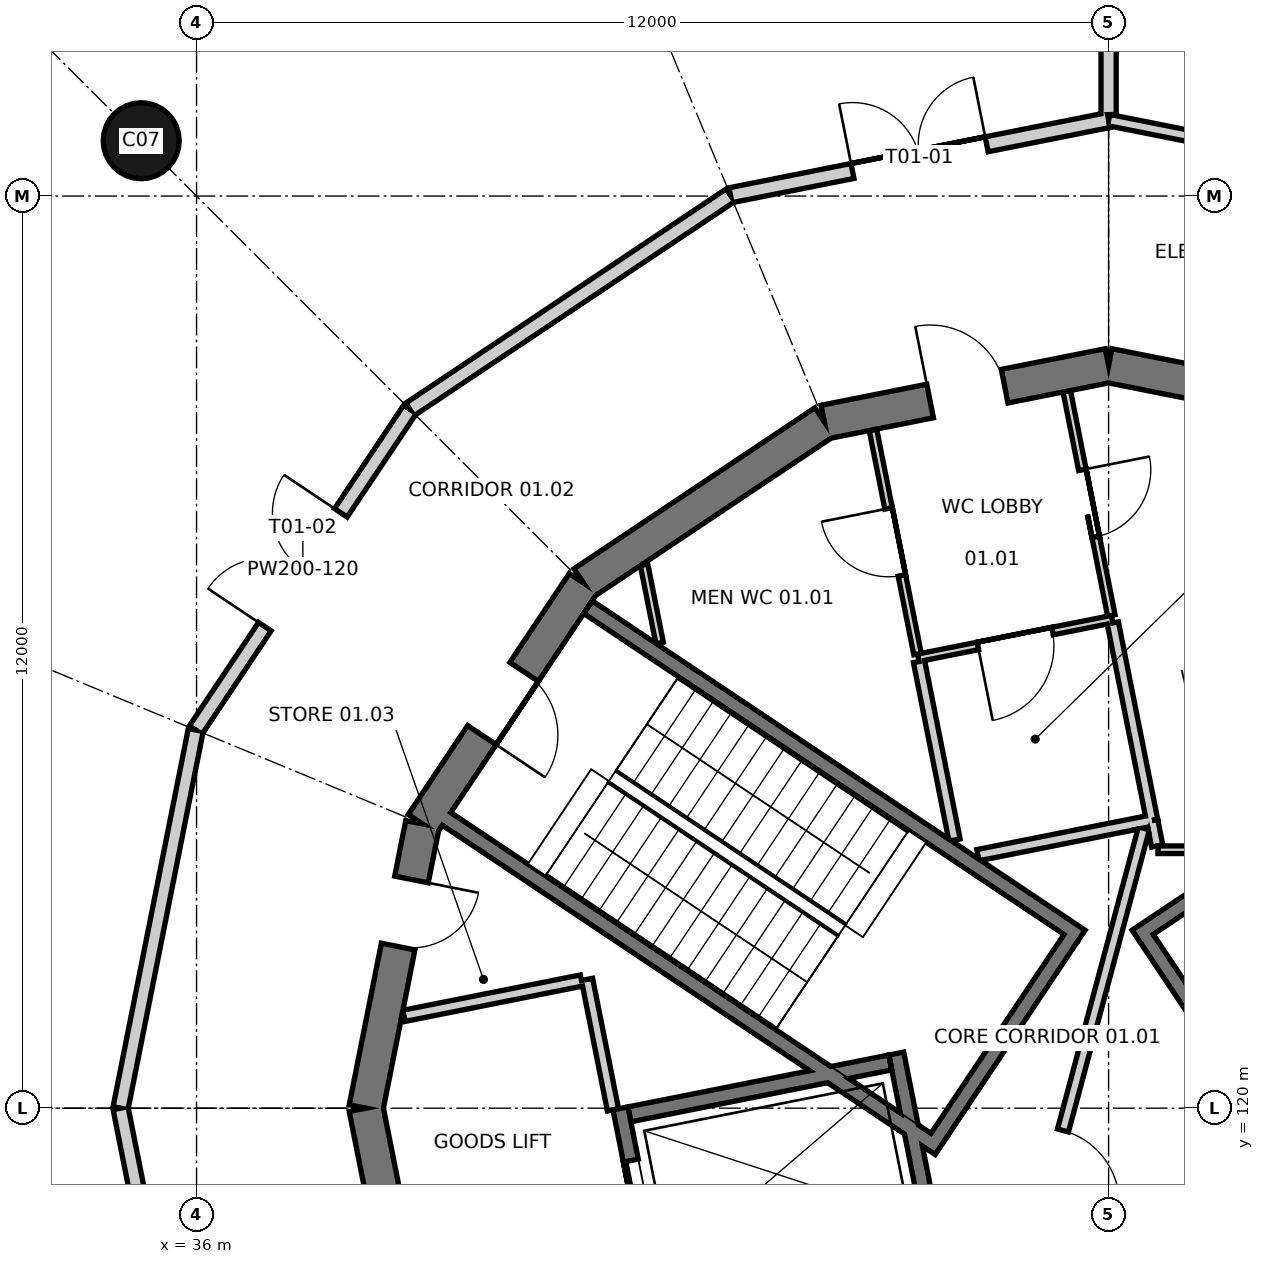
"""IFC4 building model, lengths in metres.
Left out: names, types, materials, properties, quantities, classifications, styles, units other than length and angle.
Written with IfcOpenShell. Run it as: python <this file> out.ifc"""

import sys

from ifc_helpers import new_model, si_unit, direction, frame, frame_2d, origin, origin_2d, place, context, subcontext, project, spatial, polyline, rectangle, circle, outline, extrude, element, fill, save


model = new_model("IFC4")
c1 = context("Model", 3, precision=1e-05, world=origin(), true_north=direction((0.0, 1.0)))
c2 = subcontext(c1, "Body", "Model", "MODEL_VIEW")
j1 = project(units=[si_unit("LENGTHUNIT", "METRE"), si_unit("PLANEANGLEUNIT", "RADIAN")], contexts=[c1])
p1 = place(None, origin())
s1 = spatial("IfcSite", under=j1, at=p1, CompositionType="ELEMENT")
p2 = place(p1, origin())
s2 = spatial("IfcBuilding", under=s1, at=p2, CompositionType="ELEMENT")
p3 = place(p2, frame((0.0, 0.0, 6.0)))
s3 = spatial("IfcBuildingStorey", under=s2, at=p3, CompositionType="ELEMENT", Elevation=6.0)
p4 = place(p3, frame((51.739, 129.027, 0.0), z_axis=(0.0, 0.0, 1.0), x_axis=(-0.98078948206, 0.195069197673, 0.0)))
e1 = element("IfcWall", 1, at=p4, inside=s3, PredefinedType="SHEAR", context=c2, shape_type="SweptSolid", body=[
    extrude(outline(polyline([(-0.045, -0.225), (3.857, -0.225), (3.768, 0.225), (0.045, 0.225), (-0.045, -0.225)])), origin(), (0.0, 0.0, 1.0), 4.8),
])
p5 = place(p3, frame((48.0, 129.771, 0.0), z_axis=(0.0, 0.0, 1.0), x_axis=(-0.98078948206, -0.195069197673, 0.0)))
e2 = element("IfcWall", 2, at=p5, inside=s3, PredefinedType="SHEAR", context=c2, shape_type="SweptSolid", body=[
    extrude(outline(polyline([(-0.045, -0.225), (3.857, -0.225), (3.768, 0.225), (0.045, 0.225), (-0.045, -0.225)])), origin(), (0.0, 0.0, 1.0), 4.8),
])
p6 = place(p5, frame((1.395, 0.0, 0.0)))
e3 = element("IfcOpeningElement", 3, at=p6, cuts=e2, PredefinedType="OPENING", context=c2, shape_type="SweptSolid", body=[
    extrude(rectangle(XDim=1.0, YDim=2.1, at=frame_2d((0.5, 1.05))), frame((0.0, 0.235, 0.0), z_axis=(0.0, -1.0, 0.0), x_axis=(1.0, 0.0, 0.0)), (0.0, 0.0, 1.0), 0.47),
])
p7 = place(p3, frame((44.261, 129.027, 0.0), z_axis=(0.0, 0.0, 1.0), x_axis=(-0.83148829117, -0.555542277102, 0.0)))
e4 = element("IfcWall", 4, at=p7, inside=s3, PredefinedType="SHEAR", context=c2, shape_type="SweptSolid", body=[
    extrude(outline(polyline([(-0.045, -0.225), (3.857, -0.225), (3.768, 0.225), (0.045, 0.225), (-0.045, -0.225)])), origin(), (0.0, 0.0, 1.0), 4.8),
])
p8 = place(p3, frame((41.091, 126.909, 0.0), z_axis=(0.0, 0.0, 1.0), x_axis=(-0.555542277102, -0.83148829117, 0.0)))
e5 = element("IfcWall", 5, at=p8, inside=s3, PredefinedType="SHEAR", context=c2, shape_type="SweptSolid", body=[
    extrude(outline(polyline([(-0.045, -0.225), (3.857, -0.225), (3.768, 0.225), (0.045, 0.225), (-0.045, -0.225)])), origin(), (0.0, 0.0, 1.0), 4.8),
])
p9 = place(p8, frame((1.406, 0.0, 0.0)))
e6 = element("IfcOpeningElement", 6, at=p9, cuts=e5, PredefinedType="OPENING", context=c2, shape_type="SweptSolid", body=[
    extrude(rectangle(XDim=1.0, YDim=2.1, at=frame_2d((0.5, 1.05))), frame((0.0, 0.235, 0.0), z_axis=(0.0, -1.0, 0.0), x_axis=(1.0, 0.0, 0.0)), (0.0, 0.0, 1.0), 0.47),
])
p10 = place(p3, frame((38.973, 123.739, 0.0), z_axis=(0.0, 0.0, 1.0), x_axis=(-0.195069197673, -0.98078948206, 0.0)))
e7 = element("IfcWall", 7, at=p10, inside=s3, PredefinedType="SHEAR", context=c2, shape_type="SweptSolid", body=[
    extrude(outline(polyline([(-0.045, -0.225), (3.857, -0.225), (3.768, 0.225), (0.045, 0.225), (-0.045, -0.225)])), origin(), (0.0, 0.0, 1.0), 4.8),
])
p11 = place(p10, frame((0.745, 0.0, 0.0)))
e8 = element("IfcOpeningElement", 8, at=p11, cuts=e7, PredefinedType="OPENING", context=c2, shape_type="SweptSolid", body=[
    extrude(rectangle(XDim=0.9, YDim=2.1, at=frame_2d((0.45, 1.05))), frame((0.0, 0.235, 0.0), z_axis=(0.0, -1.0, 0.0), x_axis=(1.0, 0.0, 0.0)), (0.0, 0.0, 1.0), 0.47),
])
p12 = place(p3, frame((38.229, 120.0, 0.0), z_axis=(0.0, 0.0, 1.0), x_axis=(0.195069197673, -0.98078948206, 0.0)))
e9 = element("IfcWall", 9, at=p12, inside=s3, PredefinedType="SHEAR", context=c2, shape_type="SweptSolid", body=[
    extrude(outline(polyline([(-0.045, -0.225), (3.857, -0.225), (3.768, 0.225), (0.045, 0.225), (-0.045, -0.225)])), origin(), (0.0, 0.0, 1.0), 4.8),
])
p13 = place(p12, frame((1.095, 0.0, 0.0)))
e10 = element("IfcOpeningElement", 10, at=p13, cuts=e9, PredefinedType="OPENING", context=c2, shape_type="SweptSolid", body=[
    extrude(rectangle(XDim=1.6, YDim=2.1, at=frame_2d((0.8, 1.05))), frame((0.0, 0.235, 0.0), z_axis=(0.0, -1.0, 0.0), x_axis=(1.0, 0.0, 0.0)), (0.0, 0.0, 1.0), 0.47),
])
p14 = place(p3, frame((48.365, 122.258, 0.0), z_axis=(0.0, 0.0, 1.0), x_axis=(0.831476803301, 0.555559470779, 0.0)))
e11 = element("IfcWall", 11, at=p14, inside=s3, PredefinedType="SHEAR", context=c2, shape_type="SweptSolid", body=[
    extrude(rectangle(XDim=7.8, YDim=0.2, at=frame_2d((3.9, 0.0))), origin(), (0.0, 0.0, 1.0), 4.8),
])
p15 = place(p3, frame((50.253, 119.612, 0.0), z_axis=(0.0, 0.0, 1.0), x_axis=(-0.55555842186, 0.831477504146, 0.0)))
e12 = element("IfcWall", 12, at=p15, inside=s3, PredefinedType="SHEAR", context=c2, shape_type="SweptSolid", body=[
    extrude(rectangle(XDim=3.15, YDim=0.2, at=frame_2d((1.575, 0.0))), origin(), (0.0, 0.0, 1.0), 4.8),
])
p16 = place(p3, frame((45.774, 119.473, 0.0), z_axis=(0.0, 0.0, 1.0), x_axis=(-0.831486463828, 0.555545012102, 0.0)))
e13 = element("IfcWall", 13, at=p16, inside=s3, PredefinedType="SHEAR", context=c2, shape_type="SweptSolid", body=[
    extrude(rectangle(XDim=7.8, YDim=0.2, at=frame_2d((3.9, 0.0))), origin(), (0.0, 0.0, 1.0), 4.8),
])
p17 = place(p3, frame((47.635, 122.258, 0.0), z_axis=(0.0, 0.0, 1.0), x_axis=(-0.831476803301, 0.555559470779, 0.0)))
e14 = element("IfcWall", 14, at=p17, inside=s3, PredefinedType="SHEAR", context=c2, shape_type="SweptSolid", body=[
    extrude(rectangle(XDim=7.8, YDim=0.2, at=frame_2d((3.9, 0.0))), origin(), (0.0, 0.0, 1.0), 4.8),
])
p18 = place(p3, frame((47.497, 122.231, 0.0), z_axis=(0.0, 0.0, 1.0), x_axis=(-0.55555842186, -0.831477504146, 0.0)))
e15 = element("IfcWall", 15, at=p18, inside=s3, PredefinedType="SHEAR", context=c2, shape_type="SweptSolid", body=[
    extrude(rectangle(XDim=3.15, YDim=0.2, at=frame_2d((1.575, 0.0))), origin(), (0.0, 0.0, 1.0), 4.8),
])
p19 = place(p3, frame((41.577, 119.997, 0.0), z_axis=(0.0, 0.0, 1.0), x_axis=(0.195120673769, -0.980779242576, 0.0)))
e16 = element("IfcWall", 16, at=p19, inside=s3, PredefinedType="SHEAR", context=c2, shape_type="SweptSolid", body=[
    extrude(rectangle(XDim=2.5, YDim=0.2, at=frame_2d((1.25, 0.0))), origin(), (0.0, 0.0, 1.0), 4.8),
])
p20 = place(p19, frame((0.7, 0.0, 0.0)))
e17 = element("IfcOpeningElement", 17, at=p20, cuts=e16, PredefinedType="OPENING", context=c2, shape_type="SweptSolid", body=[
    extrude(rectangle(XDim=1.1, YDim=2.1, at=frame_2d((0.55, 1.05))), frame((0.0, 0.11, 0.0), z_axis=(0.0, -1.0, 0.0), x_axis=(1.0, 0.0, 0.0)), (0.0, 0.0, 1.0), 0.22),
])
p21 = place(p3, frame((45.206, 120.719, 0.0), z_axis=(0.0, 0.0, 1.0), x_axis=(0.195158270522, -0.980771762158, 0.0)))
e18 = element("IfcWall", 18, at=p21, inside=s3, PredefinedType="SHEAR", context=c2, shape_type="SweptSolid", body=[
    extrude(rectangle(XDim=2.647, YDim=0.2, at=frame_2d((1.323, 0.0))), origin(), (0.0, 0.0, 1.0), 4.8),
])
p22 = place(p3, frame((45.127, 120.601, 0.0), z_axis=(0.0, 0.0, 1.0), x_axis=(-0.980794727808, -0.195042820694, 0.0)))
e19 = element("IfcWall", 19, at=p22, inside=s3, PredefinedType="SHEAR", context=c2, shape_type="SweptSolid", body=[
    extrude(rectangle(XDim=3.5, YDim=0.2, at=frame_2d((1.75, 0.0))), origin(), (0.0, 0.0, 1.0), 4.8),
])
p23 = place(p3, frame((35.272, 132.728, 0.0), z_axis=(0.0, 0.0, 1.0), x_axis=(1.0, 0.0, 0.0)))
e20 = element("IfcColumn", 20, at=p23, inside=s3, PredefinedType="COLUMN", context=c2, shape_type="SweptSolid", body=[
    extrude(circle(Radius=0.5, at=origin_2d()), origin(), (0.0, 0.0, 1.0), 4.8),
])
p24 = place(p3, frame((41.479, 119.977, 0.0), z_axis=(0.0, 0.0, 1.0), x_axis=(-0.19501613536, 0.98080003413, 0.0)))
e21 = element("IfcWall", 21, at=p24, inside=s3, PredefinedType="PARTITIONING", context=c2, shape_type="SweptSolid", body=[
    extrude(rectangle(XDim=1.75, YDim=0.15, at=frame_2d((0.875, 0.0))), origin(), (0.0, 0.0, 1.0), 4.5),
])
p25 = place(p3, frame((41.064, 121.679, 0.0), z_axis=(0.0, 0.0, 1.0), x_axis=(-0.980781272394, -0.195110470559, 0.0)))
e22 = element("IfcWall", 22, at=p25, inside=s3, PredefinedType="PARTITIONING", context=c2, shape_type="SweptSolid", body=[
    extrude(rectangle(XDim=2.381, YDim=0.15, at=frame_2d((1.19, 0.0))), origin(), (0.0, 0.0, 1.0), 4.5),
])
p26 = place(p3, frame((48.046, 126.433, 0.0), z_axis=(0.0, 0.0, 1.0), x_axis=(-0.980778805994, -0.195122868248, 0.0)))
e23 = element("IfcWall", 23, at=p26, inside=s3, PredefinedType="PARTITIONING", context=c2, shape_type="SweptSolid", body=[
    extrude(rectangle(XDim=2.6, YDim=0.1, at=frame_2d((1.3, 0.0))), origin(), (0.0, 0.0, 1.0), 4.5),
])
p27 = place(p26, frame((0.8, 0.0, 0.0)))
e24 = element("IfcOpeningElement", 24, at=p27, cuts=e23, PredefinedType="OPENING", context=c2, shape_type="SweptSolid", body=[
    extrude(rectangle(XDim=1.0, YDim=2.1, at=frame_2d((0.5, 1.05))), frame((0.0, 0.06, 0.0), z_axis=(0.0, -1.0, 0.0), x_axis=(1.0, 0.0, 0.0)), (0.0, 0.0, 1.0), 0.12),
])
p28 = place(p3, frame((45.486, 125.974, 0.0), z_axis=(0.0, 0.0, 1.0), x_axis=(-0.195054549846, 0.980792395252, 0.0)))
e25 = element("IfcWall", 25, at=p28, inside=s3, PredefinedType="PARTITIONING", context=c2, shape_type="SweptSolid", body=[
    extrude(rectangle(XDim=3.008, YDim=0.1, at=frame_2d((1.504, 0.0))), origin(), (0.0, 0.0, 1.0), 4.5),
])
p29 = place(p28, frame((1.054, 0.0, 0.0)))
e26 = element("IfcOpeningElement", 26, at=p29, cuts=e25, PredefinedType="OPENING", context=c2, shape_type="SweptSolid", body=[
    extrude(rectangle(XDim=0.9, YDim=2.1, at=frame_2d((0.45, 1.05))), frame((0.0, 0.06, 0.0), z_axis=(0.0, -1.0, 0.0), x_axis=(1.0, 0.0, 0.0)), (0.0, 0.0, 1.0), 0.12),
])
p30 = place(p3, frame((47.449, 129.432, 0.0), z_axis=(0.0, 0.0, 1.0), x_axis=(0.195054549846, -0.980792395252, 0.0)))
e27 = element("IfcWall", 27, at=p30, inside=s3, PredefinedType="PARTITIONING", context=c2, shape_type="SweptSolid", body=[
    extrude(rectangle(XDim=3.008, YDim=0.1, at=frame_2d((1.504, 0.0))), origin(), (0.0, 0.0, 1.0), 4.5),
])
p31 = place(p30, frame((1.054, 0.0, 0.0)))
e28 = element("IfcOpeningElement", 28, at=p31, cuts=e27, PredefinedType="OPENING", context=c2, shape_type="SweptSolid", body=[
    extrude(rectangle(XDim=0.9, YDim=2.1, at=frame_2d((0.45, 1.05))), frame((0.0, 0.06, 0.0), z_axis=(0.0, -1.0, 0.0), x_axis=(1.0, 0.0, 0.0)), (0.0, 0.0, 1.0), 0.12),
])
p32 = place(p3, frame((48.056, 126.384, 0.0), z_axis=(0.0, 0.0, 1.0), x_axis=(0.195123903338, -0.980778600065, 0.0)))
e29 = element("IfcWall", 29, at=p32, inside=s3, PredefinedType="PARTITIONING", context=c2, shape_type="SweptSolid", body=[
    extrude(rectangle(XDim=2.65, YDim=0.15, at=frame_2d((1.325, 0.0))), origin(), (0.0, 0.0, 1.0), 4.5),
])
p33 = place(p3, frame((48.524, 123.775, 0.0), z_axis=(0.0, 0.0, 1.0), x_axis=(-0.980777249161, -0.195130693455, 0.0)))
e30 = element("IfcWall", 30, at=p33, inside=s3, PredefinedType="PARTITIONING", context=c2, shape_type="SweptSolid", body=[
    extrude(rectangle(XDim=2.287, YDim=0.15, at=frame_2d((1.144, 0.0))), origin(), (0.0, 0.0, 1.0), 4.5),
])
p34 = place(p3, frame((45.973, 123.528, 0.0), z_axis=(0.0, 0.0, 1.0), x_axis=(-0.195135731435, 0.980776246815, 0.0)))
e31 = element("IfcWall", 31, at=p34, inside=s3, PredefinedType="PARTITIONING", context=c2, shape_type="SweptSolid", body=[
    extrude(rectangle(XDim=2.395, YDim=0.15, at=frame_2d((1.197, 0.0))), origin(), (0.0, 0.0, 1.0), 4.5),
])
p35 = place(p3, frame((42.093, 126.12, 0.0), z_axis=(0.0, 0.0, 1.0), x_axis=(-0.195175461866, 0.980768341192, 0.0)))
e32 = element("IfcWall", 32, at=p35, inside=s3, PredefinedType="PARTITIONING", context=c2, shape_type="SweptSolid", body=[
    extrude(rectangle(XDim=1.048, YDim=0.1, at=frame_2d((0.524, 0.0))), origin(), (0.0, 0.0, 1.0), 4.5),
])
p36 = place(p3, frame((49.823, 123.4, 0.0), z_axis=(0.0, 0.0, 1.0), x_axis=(-1.0, 0.0, 0.0)))
e33 = element("IfcWall", 33, at=p36, inside=s3, PredefinedType="PARTITIONING", context=c2, shape_type="SweptSolid", body=[
    extrude(rectangle(XDim=1.174, YDim=0.1, at=frame_2d((0.587, 0.0))), origin(), (0.0, 0.0, 1.0), 4.5),
])
p37 = place(p3, frame((48.639, 123.449, 0.0), z_axis=(0.0, 0.0, 1.0), x_axis=(-0.194880473507, 0.98082699853, 0.0)))
e34 = element("IfcWall", 34, at=p37, inside=s3, PredefinedType="PARTITIONING", context=c2, shape_type="SweptSolid", body=[
    extrude(rectangle(XDim=0.342, YDim=0.15, at=frame_2d((0.171, 0.0))), origin(), (0.0, 0.0, 1.0), 4.5),
])
p38 = place(p3, frame((47.102, 118.595, 0.0), z_axis=(0.0, 0.0, 1.0), x_axis=(0.258814124304, 0.9659271448, 0.0)))
e35 = element("IfcWall", 35, at=p38, inside=s3, PredefinedType="PARTITIONING", context=c2, shape_type="SweptSolid", body=[
    extrude(rectangle(XDim=5.265, YDim=0.15, at=frame_2d((2.632, 0.0))), origin(), (0.0, 0.0, 1.0), 4.5),
])
p39 = place(p38, frame((0.15, 0.0, 0.0)))
e36 = element("IfcOpeningElement", 36, at=p39, cuts=e35, PredefinedType="OPENING", context=c2, shape_type="SweptSolid", body=[
    extrude(rectangle(XDim=1.0, YDim=2.1, at=frame_2d((0.5, 1.05))), frame((0.0, 0.085, 0.0), z_axis=(0.0, -1.0, 0.0), x_axis=(1.0, 0.0, 0.0)), (0.0, 0.0, 1.0), 0.17),
])
p40 = place(p3, frame((48.0, 133.0, 0.0), z_axis=(0.0, 0.0, 1.0), x_axis=(0.980787465891, -0.195079334507, 0.0)))
e37 = element("IfcWall", 37, at=p40, inside=s3, PredefinedType="PARTITIONING", context=c2, shape_type="SweptSolid", body=[
    extrude(rectangle(XDim=5.072, YDim=0.15, at=frame_2d((2.536, 0.0))), origin(), (0.0, 0.0, 1.0), 4.5),
])
p41 = place(p40, frame((2.036, 0.0, 0.0)))
e38 = element("IfcOpeningElement", 38, at=p41, cuts=e37, PredefinedType="OPENING", context=c2, shape_type="SweptSolid", body=[
    extrude(rectangle(XDim=1.0, YDim=2.1, at=frame_2d((0.5, 1.05))), frame((0.0, 0.085, 0.0), z_axis=(0.0, -1.0, 0.0), x_axis=(1.0, 0.0, 0.0)), (0.0, 0.0, 1.0), 0.17),
])
p42 = place(p3, frame((35.0, 120.0, 0.0), z_axis=(0.0, 0.0, 1.0), x_axis=(0.195079334507, 0.980787465891, 0.0)))
e39 = element("IfcWall", 39, at=p42, inside=s3, PredefinedType="SOLIDWALL", context=c2, shape_type="SweptSolid", body=[
    extrude(rectangle(XDim=5.072, YDim=0.2, at=frame_2d((2.536, 0.0))), origin(), (0.0, 0.0, 1.0), 4.5),
])
p43 = place(p3, frame((35.99, 124.975, 0.0), z_axis=(0.0, 0.0, 1.0), x_axis=(0.555577354854, 0.831464853601, 0.0)))
e40 = element("IfcWall", 40, at=p43, inside=s3, PredefinedType="SOLIDWALL", context=c2, shape_type="SweptSolid", body=[
    extrude(rectangle(XDim=5.073, YDim=0.2, at=frame_2d((2.536, 0.0))), origin(), (0.0, 0.0, 1.0), 4.5),
])
p44 = place(p43, frame((1.636, 0.0, 0.0)))
e41 = element("IfcOpeningElement", 41, at=p44, cuts=e40, PredefinedType="OPENING", context=c2, shape_type="SweptSolid", body=[
    extrude(rectangle(XDim=1.8, YDim=2.1, at=frame_2d((0.9, 1.05))), frame((0.0, 0.11, 0.0), z_axis=(0.0, -1.0, 0.0), x_axis=(1.0, 0.0, 0.0)), (0.0, 0.0, 1.0), 0.22),
])
p45 = place(p3, frame((38.808, 129.192, 0.0), z_axis=(0.0, 0.0, 1.0), x_axis=(0.831464853601, 0.555577354854, 0.0)))
e42 = element("IfcWall", 42, at=p45, inside=s3, PredefinedType="SOLIDWALL", context=c2, shape_type="SweptSolid", body=[
    extrude(rectangle(XDim=5.073, YDim=0.2, at=frame_2d((2.536, 0.0))), origin(), (0.0, 0.0, 1.0), 4.5),
])
p46 = place(p3, frame((43.025, 132.01, 0.0), z_axis=(0.0, 0.0, 1.0), x_axis=(0.980787465891, 0.195079334507, 0.0)))
e43 = element("IfcWall", 43, at=p46, inside=s3, PredefinedType="SOLIDWALL", context=c2, shape_type="SweptSolid", body=[
    extrude(rectangle(XDim=5.072, YDim=0.2, at=frame_2d((2.536, 0.0))), origin(), (0.0, 0.0, 1.0), 4.5),
])
p47 = place(p46, frame((1.636, 0.0, 0.0)))
e44 = element("IfcOpeningElement", 44, at=p47, cuts=e43, PredefinedType="OPENING", context=c2, shape_type="SweptSolid", body=[
    extrude(rectangle(XDim=1.8, YDim=2.1, at=frame_2d((0.9, 1.05))), frame((0.0, 0.11, 0.0), z_axis=(0.0, -1.0, 0.0), x_axis=(1.0, 0.0, 0.0)), (0.0, 0.0, 1.0), 0.22),
])
p48 = place(p3, frame((35.99, 115.025, 0.0), z_axis=(0.0, 0.0, 1.0), x_axis=(-0.195079334507, 0.980787465891, 0.0)))
e45 = element("IfcWall", 45, at=p48, inside=s3, PredefinedType="SOLIDWALL", context=c2, shape_type="SweptSolid", body=[
    extrude(rectangle(XDim=5.072, YDim=0.2, at=frame_2d((2.536, 0.0))), origin(), (0.0, 0.0, 1.0), 4.5),
])
p49 = place(p3, frame((48.0, 137.51, 0.0), z_axis=(0.0, 0.0, 1.0), x_axis=(0.0, -1.0, 0.0)))
e46 = element("IfcWall", 46, at=p49, inside=s3, PredefinedType="SOLIDWALL", context=c2, shape_type="SweptSolid", body=[
    extrude(rectangle(XDim=4.438, YDim=0.2, at=frame_2d((2.219, 0.0))), origin(), (0.0, 0.0, 1.0), 3.7),
])
p50 = place(p9, origin())
e47 = element("IfcDoor", 47, at=p50, inside=s3, OperationType="SINGLE_SWING_RIGHT", PredefinedType="DOOR", context=c2, shape_type="SweptSolid", body=[
    extrude(rectangle(XDim=1.0, YDim=2.1, at=frame_2d((0.5, 1.05))), frame((0.0, 0.025, 0.0), z_axis=(0.0, -1.0, 0.0), x_axis=(1.0, 0.0, 0.0)), (0.0, 0.0, 1.0), 0.05),
])
fill(e6, e47)
p51 = place(p20, origin())
e48 = element("IfcDoor", 48, at=p51, inside=s3, OperationType="SLIDING_TO_LEFT", PredefinedType="DOOR", context=c2, shape_type="SweptSolid", body=[
    extrude(rectangle(XDim=1.1, YDim=2.1, at=frame_2d((0.55, 1.05))), frame((0.0, 0.025, 0.0), z_axis=(0.0, -1.0, 0.0), x_axis=(1.0, 0.0, 0.0)), (0.0, 0.0, 1.0), 0.05),
])
fill(e17, e48)
p52 = place(p6, frame((1.0, 0.0, 0.0), z_axis=(0.0, 0.0, 1.0), x_axis=(-1.0, 0.0, 0.0)))
e49 = element("IfcDoor", 49, at=p52, inside=s3, OperationType="SINGLE_SWING_LEFT", PredefinedType="DOOR", context=c2, shape_type="SweptSolid", body=[
    extrude(rectangle(XDim=1.0, YDim=2.1, at=frame_2d((0.5, 1.05))), frame((0.0, 0.025, 0.0), z_axis=(0.0, -1.0, 0.0), x_axis=(1.0, 0.0, 0.0)), (0.0, 0.0, 1.0), 0.05),
])
fill(e3, e49)
p53 = place(p11, origin())
e50 = element("IfcDoor", 50, at=p53, inside=s3, OperationType="SINGLE_SWING_LEFT", PredefinedType="DOOR", context=c2, shape_type="SweptSolid", body=[
    extrude(rectangle(XDim=0.9, YDim=2.1, at=frame_2d((0.45, 1.05))), frame((0.0, 0.025, 0.0), z_axis=(0.0, -1.0, 0.0), x_axis=(1.0, 0.0, 0.0)), (0.0, 0.0, 1.0), 0.05),
])
fill(e8, e50)
p54 = place(p27, origin())
e51 = element("IfcDoor", 51, at=p54, inside=s3, OperationType="SINGLE_SWING_RIGHT", PredefinedType="DOOR", context=c2, shape_type="SweptSolid", body=[
    extrude(rectangle(XDim=1.0, YDim=2.1, at=frame_2d((0.5, 1.05))), frame((0.0, 0.025, 0.0), z_axis=(0.0, -1.0, 0.0), x_axis=(1.0, 0.0, 0.0)), (0.0, 0.0, 1.0), 0.05),
])
fill(e24, e51)
p55 = place(p29, origin())
e52 = element("IfcDoor", 52, at=p55, inside=s3, OperationType="SINGLE_SWING_RIGHT", PredefinedType="DOOR", context=c2, shape_type="SweptSolid", body=[
    extrude(rectangle(XDim=0.9, YDim=2.1, at=frame_2d((0.45, 1.05))), frame((0.0, 0.025, 0.0), z_axis=(0.0, -1.0, 0.0), x_axis=(1.0, 0.0, 0.0)), (0.0, 0.0, 1.0), 0.05),
])
fill(e26, e52)
p56 = place(p31, origin())
e53 = element("IfcDoor", 53, at=p56, inside=s3, OperationType="SINGLE_SWING_LEFT", PredefinedType="DOOR", context=c2, shape_type="SweptSolid", body=[
    extrude(rectangle(XDim=0.9, YDim=2.1, at=frame_2d((0.45, 1.05))), frame((0.0, 0.025, 0.0), z_axis=(0.0, -1.0, 0.0), x_axis=(1.0, 0.0, 0.0)), (0.0, 0.0, 1.0), 0.05),
])
fill(e28, e53)
p57 = place(p39, frame((1.0, 0.0, 0.0), z_axis=(0.0, 0.0, 1.0), x_axis=(-1.0, 0.0, 0.0)))
e54 = element("IfcDoor", 54, at=p57, inside=s3, OperationType="SINGLE_SWING_RIGHT", PredefinedType="DOOR", context=c2, shape_type="SweptSolid", body=[
    extrude(rectangle(XDim=1.0, YDim=2.1, at=frame_2d((0.5, 1.05))), frame((0.0, 0.025, 0.0), z_axis=(0.0, -1.0, 0.0), x_axis=(1.0, 0.0, 0.0)), (0.0, 0.0, 1.0), 0.05),
])
fill(e36, e54)
p58 = place(p47, origin())
e55 = element("IfcDoor", 55, at=p58, inside=s3, OperationType="DOUBLE_DOOR_SINGLE_SWING", PredefinedType="DOOR", context=c2, shape_type="SweptSolid", body=[
    extrude(rectangle(XDim=1.8, YDim=2.1, at=frame_2d((0.9, 1.05))), frame((0.0, 0.025, 0.0), z_axis=(0.0, -1.0, 0.0), x_axis=(1.0, 0.0, 0.0)), (0.0, 0.0, 1.0), 0.05),
])
fill(e44, e55)
p59 = place(p44, origin())
e56 = element("IfcDoor", 56, at=p59, inside=s3, OperationType="DOUBLE_DOOR_SINGLE_SWING", PredefinedType="DOOR", context=c2, shape_type="SweptSolid", body=[
    extrude(rectangle(XDim=1.8, YDim=2.1, at=frame_2d((0.9, 1.05))), frame((0.0, 0.025, 0.0), z_axis=(0.0, -1.0, 0.0), x_axis=(1.0, 0.0, 0.0)), (0.0, 0.0, 1.0), 0.05),
])
fill(e41, e56)
save(model, sys.argv[1])
